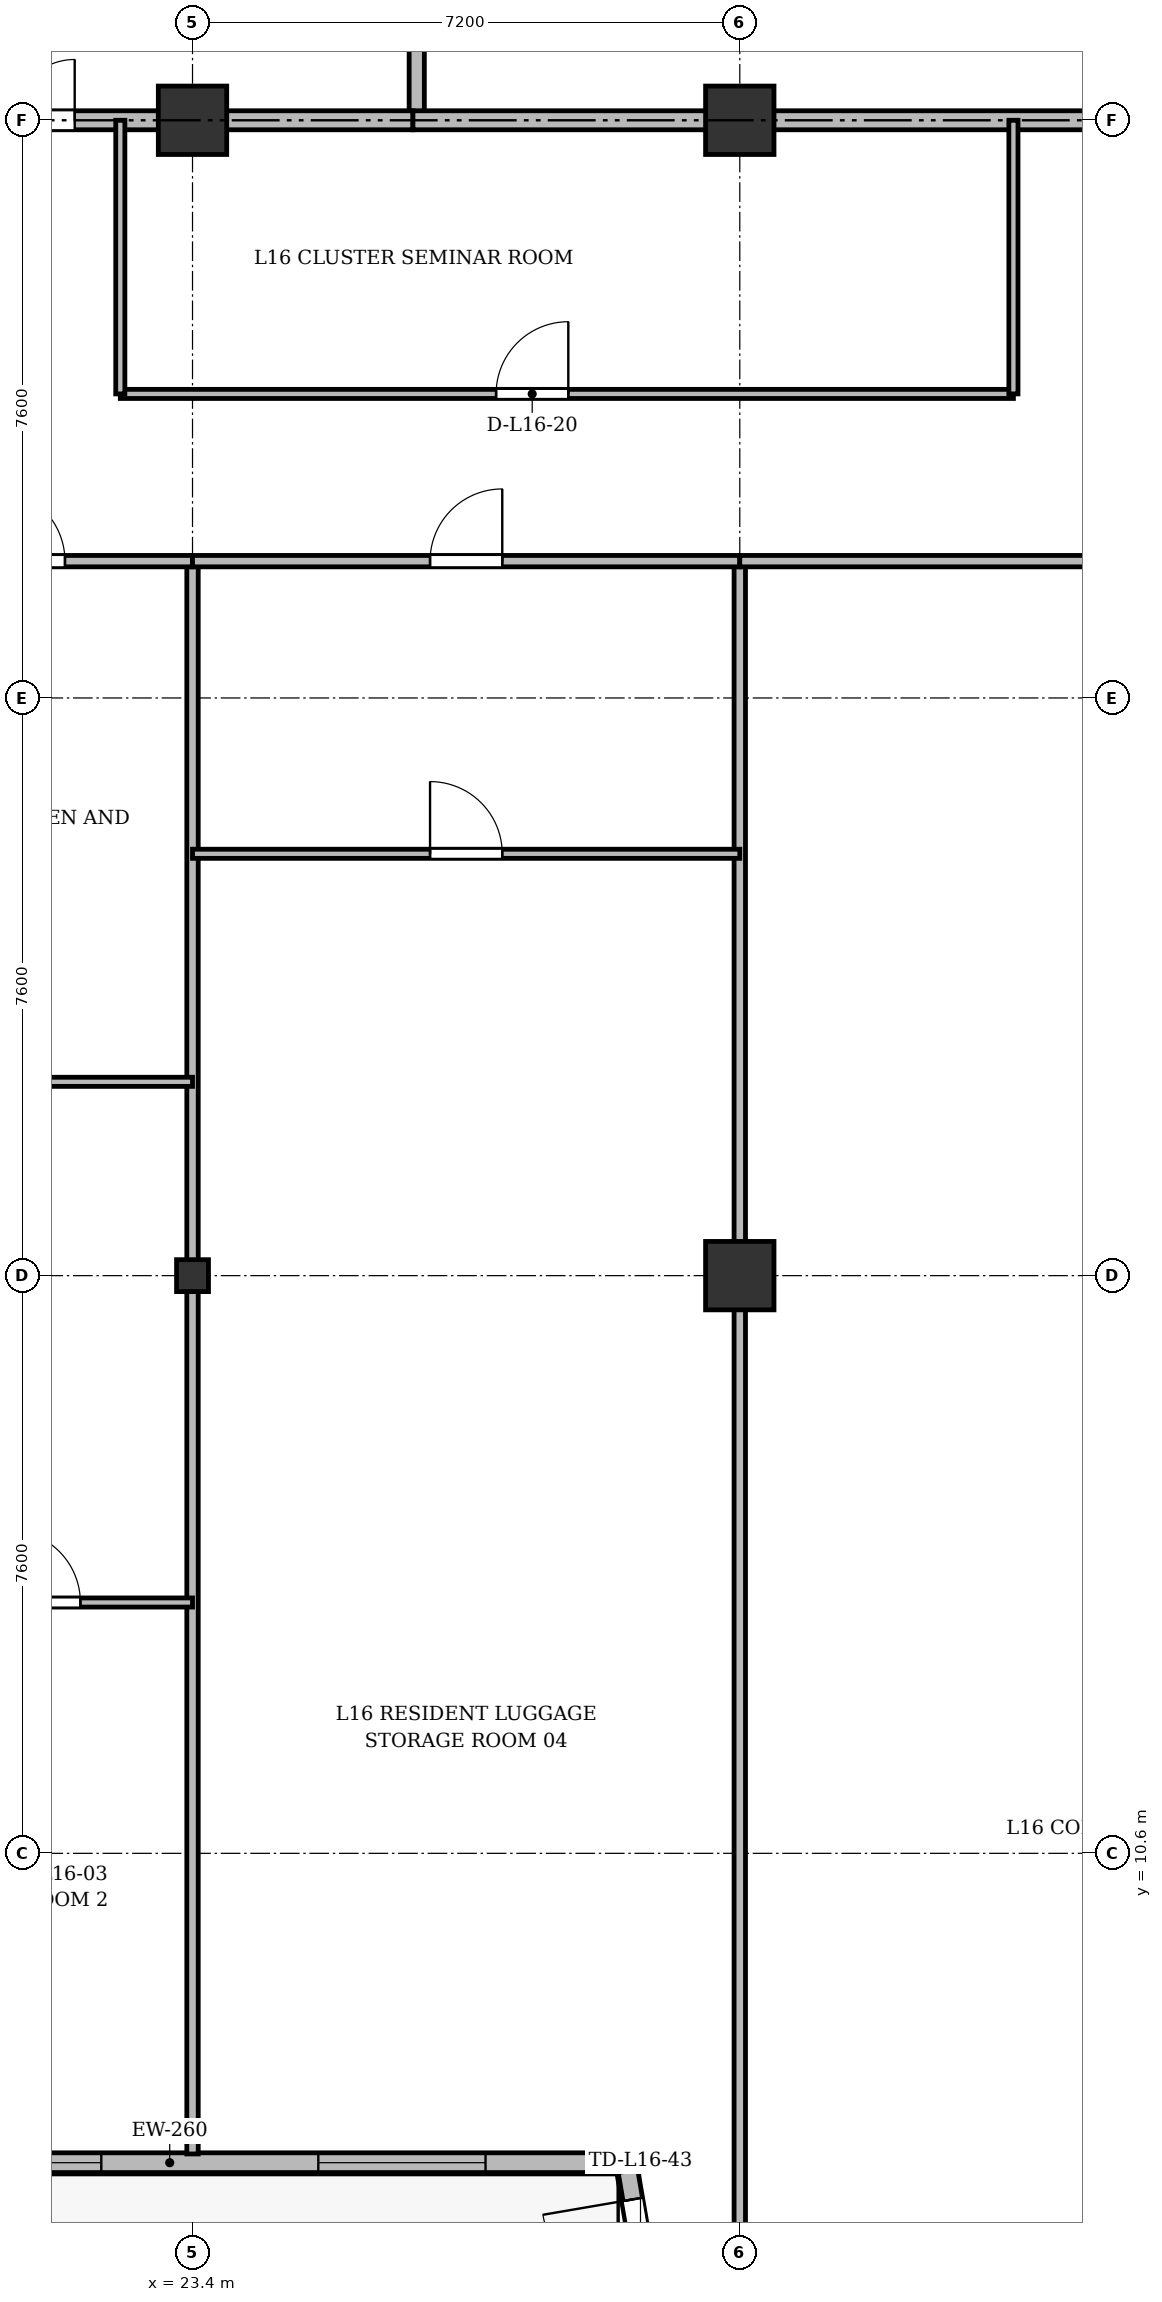
"""IFC4 building model, lengths in metres.
Left out: names, types, materials, properties, quantities, classifications, styles, units other than length and angle.
Written with IfcOpenShell. Run it as: python <this file> out.ifc"""

import sys

from ifc_helpers import new_model, si_unit, direction, frame, frame_2d, origin, origin_2d, place, context, subcontext, project, spatial, rectangle, i_section, extrude, source, transform, mapped, element, fill, save


model = new_model("IFC4")
c1 = context("Model", 3, precision=1e-05, world=origin(), true_north=direction((0.0, 1.0)))
c2 = subcontext(c1, "Body", "Model", "MODEL_VIEW")
j1 = project(units=[si_unit("LENGTHUNIT", "METRE"), si_unit("PLANEANGLEUNIT", "RADIAN")], contexts=[c1])
p1 = place(None, origin())
s1 = spatial("IfcSite", under=j1, at=p1, CompositionType="ELEMENT")
p2 = place(p1, origin())
s2 = spatial("IfcBuilding", under=s1, at=p2, CompositionType="ELEMENT")
p3 = place(p2, frame((0.0, 0.0, 63.1)))
s3 = spatial("IfcBuildingStorey", under=s2, at=p3, CompositionType="ELEMENT", Elevation=63.1)
m1 = source(origin(), c2, "Body", "SweptSolid", [
    extrude(i_section(OverallWidth=0.42, OverallDepth=0.42, WebThickness=0.026, FlangeThickness=0.04, at=origin_2d()), origin(), (0.0, 0.0, 1.0), 3.6),
])
p4 = place(p3, frame((23.4, 18.2, 0.0), z_axis=(0.0, 0.0, 1.0), x_axis=(1.0, 0.0, 0.0)))
e1 = element("IfcColumn", 1, at=p4, inside=s3, PredefinedType="COLUMN", context=c2, shape_type="MappedRepresentation", body=[
    mapped(m1, transform((0.0, 0.0, 0.0), x_axis=(1.0, 0.0, 0.0), y_axis=(0.0, 1.0, 0.0), z_axis=(0.0, 0.0, 1.0), scale=1.0)),
])
m2 = source(origin(), c2, "Body", "SweptSolid", [
    extrude(rectangle(XDim=0.9, YDim=0.9, at=origin_2d()), origin(), (0.0, 0.0, 1.0), 3.6),
])
for number, where, z_axis, x_axis in (
    (2, (23.4, 33.4, 0.0), (0.0, 0.0, 1.0), (1.0, 0.0, 0.0)),
    (3, (30.6, 18.2, 0.0), (0.0, 0.0, 1.0), (1.0, 0.0, 0.0)),
    (4, (30.6, 33.4, 0.0), (0.0, 0.0, 1.0), (1.0, 0.0, 0.0)),
):
    element("IfcColumn", number, at=place(p3, frame(where, z_axis=z_axis, x_axis=x_axis)), inside=s3, PredefinedType="COLUMN", context=c2, shape_type="MappedRepresentation", body=[
        mapped(m2, transform((0.0, 0.0, 0.0), x_axis=(1.0, 0.0, 0.0), y_axis=(0.0, 1.0, 0.0), z_axis=(0.0, 0.0, 1.0), scale=1.0)),
    ])
p5 = place(p3, frame((29.728, 2.922, 0.0), z_axis=(0.0, 0.0, 1.0), x_axis=(-0.168923741424, 0.98562912375, 0.0)))
e5 = element("IfcWall", 5, at=p5, inside=s3, PredefinedType="SOLIDWALL", context=c2, shape_type="SweptSolid", body=[
    extrude(rectangle(XDim=3.551, YDim=0.26, at=frame_2d((1.775, 0.0))), origin(), (0.0, 0.0, 1.0), 2.69),
])
p6 = place(p5, frame((1.971, 0.0, 0.0)))
e6 = element("IfcOpeningElement", 6, at=p6, cuts=e5, PredefinedType="OPENING", context=c2, shape_type="SweptSolid", body=[
    extrude(rectangle(XDim=1.2, YDim=2.2, at=frame_2d((0.6, 1.1))), frame((0.0, 0.14, 0.0), z_axis=(0.0, -1.0, 0.0), x_axis=(1.0, 0.0, 0.0)), (0.0, 0.0, 1.0), 0.28),
])
p7 = place(p3, frame((29.0, 6.53, 0.0), z_axis=(0.0, 0.0, 1.0), x_axis=(-1.0, 0.0, 0.0)))
e7 = element("IfcWall", 7, at=p7, inside=s3, PredefinedType="SOLIDWALL", context=c2, shape_type="SweptSolid", body=[
    extrude(rectangle(XDim=11.8, YDim=0.26, at=frame_2d((5.9, 0.0))), origin(), (0.0, 0.0, 1.0), 2.752),
])
p8 = place(p7, frame((1.745, 0.0, 0.9)))
e8 = element("IfcOpeningElement", 8, at=p8, cuts=e7, PredefinedType="OPENING", context=c2, shape_type="SweptSolid", body=[
    extrude(rectangle(XDim=2.2, YDim=1.75, at=frame_2d((1.1, 0.875))), frame((0.0, 0.14, 0.0), z_axis=(0.0, -1.0, 0.0), x_axis=(1.0, 0.0, 0.0)), (0.0, 0.0, 1.0), 0.28),
])
p9 = place(p7, frame((6.8, 0.0, 0.9)))
e9 = element("IfcOpeningElement", 9, at=p9, cuts=e7, PredefinedType="OPENING", context=c2, shape_type="SweptSolid", body=[
    extrude(rectangle(XDim=1.5, YDim=1.75, at=frame_2d((0.75, 0.875))), frame((0.0, 0.14, 0.0), z_axis=(0.0, -1.0, 0.0), x_axis=(1.0, 0.0, 0.0)), (0.0, 0.0, 1.0), 0.28),
])
p10 = place(p7, frame((9.855, 0.0, 0.9)))
e10 = element("IfcOpeningElement", 10, at=p10, cuts=e7, PredefinedType="OPENING", context=c2, shape_type="SweptSolid", body=[
    extrude(rectangle(XDim=1.5, YDim=1.75, at=frame_2d((0.75, 0.875))), frame((0.0, 0.14, 0.0), z_axis=(0.0, -1.0, 0.0), x_axis=(1.0, 0.0, 0.0)), (0.0, 0.0, 1.0), 0.28),
])
p11 = place(p3, frame((26.35, 33.4, 0.0), z_axis=(0.0, 0.0, 1.0), x_axis=(0.0, 1.0, 0.0)))
e11 = element("IfcWall", 11, at=p11, inside=s3, PredefinedType="SOLIDWALL", context=c2, shape_type="SweptSolid", body=[
    extrude(rectangle(XDim=11.3, YDim=0.2, at=frame_2d((5.65, 0.0))), origin(), (0.0, 0.0, 1.0), 2.69),
])
p12 = place(p3, frame((19.5, 33.4, 0.0), z_axis=(0.0, 0.0, 1.0), x_axis=(1.0, 0.0, 0.0)))
e12 = element("IfcWall", 12, at=p12, inside=s3, PredefinedType="PARTITIONING", context=c2, shape_type="SweptSolid", body=[
    extrude(rectangle(XDim=6.8, YDim=0.25, at=frame_2d((3.4, 0.0))), origin(), (0.0, 0.0, 1.0), 2.69),
])
p13 = place(p12, frame((0.75, 0.0, 0.0)))
e13 = element("IfcOpeningElement", 13, at=p13, cuts=e12, PredefinedType="OPENING", context=c2, shape_type="SweptSolid", body=[
    extrude(rectangle(XDim=1.6, YDim=2.2, at=frame_2d((0.8, 1.1))), frame((0.0, 0.135, 0.0), z_axis=(0.0, -1.0, 0.0), x_axis=(1.0, 0.0, 0.0)), (0.0, 0.0, 1.0), 0.27),
])
p14 = place(p3, frame((26.3, 33.4, 0.0), z_axis=(0.0, 0.0, 1.0), x_axis=(1.0, 0.0, 0.0)))
e14 = element("IfcWall", 14, at=p14, inside=s3, PredefinedType="PARTITIONING", context=c2, shape_type="SweptSolid", body=[
    extrude(rectangle(XDim=20.85, YDim=0.25, at=frame_2d((10.425, 0.0))), origin(), (0.0, 0.0, 1.0), 2.69),
])
p15 = place(p14, frame((9.2, 0.0, 0.0)))
e15 = element("IfcOpeningElement", 15, at=p15, cuts=e14, PredefinedType="OPENING", context=c2, shape_type="SweptSolid", body=[
    extrude(rectangle(XDim=1.6, YDim=2.2, at=frame_2d((0.8, 1.1))), frame((0.0, 0.135, 0.0), z_axis=(0.0, -1.0, 0.0), x_axis=(1.0, 0.0, 0.0)), (0.0, 0.0, 1.0), 0.27),
])
p16 = place(p3, frame((22.45, 29.8, 0.0), z_axis=(0.0, 0.0, 1.0), x_axis=(1.0, 0.0, 0.0)))
e16 = element("IfcWall", 16, at=p16, inside=s3, PredefinedType="PARTITIONING", context=c2, shape_type="SweptSolid", body=[
    extrude(rectangle(XDim=11.75, YDim=0.12, at=frame_2d((5.875, 0.0))), origin(), (0.0, 0.0, 1.0), 2.752),
])
p17 = place(p16, frame((4.944, 0.0, 0.0)))
e17 = element("IfcOpeningElement", 17, at=p17, cuts=e16, PredefinedType="OPENING", context=c2, shape_type="SweptSolid", body=[
    extrude(rectangle(XDim=0.95, YDim=2.15, at=frame_2d((0.475, 1.075))), frame((0.0, 0.07, 0.0), z_axis=(0.0, -1.0, 0.0), x_axis=(1.0, 0.0, 0.0)), (0.0, 0.0, 1.0), 0.14),
])
for number, where, z_axis, x_axis in (
    (18, (22.45, 29.8, 0.0), (0.0, 0.0, 1.0), (0.0, 1.0, 0.0)),
    (19, (34.2, 29.8, 0.0), (0.0, 0.0, 1.0), (0.0, 1.0, 0.0)),
):
    element("IfcWall", number, at=place(p3, frame(where, z_axis=z_axis, x_axis=x_axis)), inside=s3, PredefinedType="PARTITIONING", context=c2, shape_type="SweptSolid", body=[
        extrude(rectangle(XDim=3.6, YDim=0.12, at=frame_2d((1.8, 0.0))), origin(), (0.0, 0.0, 1.0), 2.69),
    ])
p18 = place(p3, frame((23.4, 6.645, 0.0), z_axis=(0.0, 0.0, 1.0), x_axis=(0.0, 1.0, 0.0)))
e20 = element("IfcWall", 20, at=p18, inside=s3, PredefinedType="PARTITIONING", context=c2, shape_type="SweptSolid", body=[
    extrude(rectangle(XDim=20.955, YDim=0.15, at=frame_2d((10.478, 0.0))), origin(), (0.0, 0.0, 1.0), 2.752),
])
p19 = place(p3, frame((30.6, 3.145, 0.0), z_axis=(0.0, 0.0, 1.0), x_axis=(0.0, 1.0, 0.0)))
e21 = element("IfcWall", 21, at=p19, inside=s3, PredefinedType="PARTITIONING", context=c2, shape_type="SweptSolid", body=[
    extrude(rectangle(XDim=24.455, YDim=0.15, at=frame_2d((12.228, 0.0))), origin(), (0.0, 0.0, 1.0), 2.752),
])
p20 = place(p3, frame((15.6, 20.75, 0.0), z_axis=(0.0, 0.0, 1.0), x_axis=(1.0, 0.0, 0.0)))
e22 = element("IfcWall", 22, at=p20, inside=s3, PredefinedType="PARTITIONING", context=c2, shape_type="SweptSolid", body=[
    extrude(rectangle(XDim=7.8, YDim=0.12, at=frame_2d((3.9, 0.0))), origin(), (0.0, 0.0, 1.0), 2.752),
])
p21 = place(p20, frame((3.333, 0.0, 0.0)))
e23 = element("IfcOpeningElement", 23, at=p21, cuts=e22, PredefinedType="OPENING", context=c2, shape_type="SweptSolid", body=[
    extrude(rectangle(XDim=0.95, YDim=2.15, at=frame_2d((0.475, 1.075))), frame((0.0, 0.07, 0.0), z_axis=(0.0, -1.0, 0.0), x_axis=(1.0, 0.0, 0.0)), (0.0, 0.0, 1.0), 0.14),
])
p22 = place(p3, frame((15.6, 27.6, 0.0), z_axis=(0.0, 0.0, 1.0), x_axis=(1.0, 0.0, 0.0)))
e24 = element("IfcWall", 24, at=p22, inside=s3, PredefinedType="PARTITIONING", context=c2, shape_type="SweptSolid", body=[
    extrude(rectangle(XDim=7.8, YDim=0.15, at=frame_2d((3.9, 0.0))), origin(), (0.0, 0.0, 1.0), 2.752),
])
p23 = place(p22, frame((5.172, 0.0, 0.0)))
e25 = element("IfcOpeningElement", 25, at=p23, cuts=e24, PredefinedType="OPENING", context=c2, shape_type="SweptSolid", body=[
    extrude(rectangle(XDim=0.95, YDim=2.15, at=frame_2d((0.475, 1.075))), frame((0.0, 0.085, 0.0), z_axis=(0.0, -1.0, 0.0), x_axis=(1.0, 0.0, 0.0)), (0.0, 0.0, 1.0), 0.17),
])
p24 = place(p3, frame((19.5, 13.9, 0.0), z_axis=(0.0, 0.0, 1.0), x_axis=(1.0, 0.0, 0.0)))
e26 = element("IfcWall", 26, at=p24, inside=s3, PredefinedType="PARTITIONING", context=c2, shape_type="SweptSolid", body=[
    extrude(rectangle(XDim=3.9, YDim=0.12, at=frame_2d((1.95, 0.0))), origin(), (0.0, 0.0, 1.0), 2.752),
])
p25 = place(p24, frame((1.475, 0.0, 0.0)))
e27 = element("IfcOpeningElement", 27, at=p25, cuts=e26, PredefinedType="OPENING", context=c2, shape_type="SweptSolid", body=[
    extrude(rectangle(XDim=0.95, YDim=2.15, at=frame_2d((0.475, 1.075))), frame((0.0, 0.07, 0.0), z_axis=(0.0, -1.0, 0.0), x_axis=(1.0, 0.0, 0.0)), (0.0, 0.0, 1.0), 0.14),
])
p26 = place(p3, frame((23.4, 27.6, 0.0), z_axis=(0.0, 0.0, 1.0), x_axis=(1.0, 0.0, 0.0)))
e28 = element("IfcWall", 28, at=p26, inside=s3, PredefinedType="PARTITIONING", context=c2, shape_type="SweptSolid", body=[
    extrude(rectangle(XDim=7.2, YDim=0.15, at=frame_2d((3.6, 0.0))), origin(), (0.0, 0.0, 1.0), 2.752),
])
p27 = place(p26, frame((3.125, 0.0, 0.0)))
e29 = element("IfcOpeningElement", 29, at=p27, cuts=e28, PredefinedType="OPENING", context=c2, shape_type="SweptSolid", body=[
    extrude(rectangle(XDim=0.95, YDim=2.15, at=frame_2d((0.475, 1.075))), frame((0.0, 0.085, 0.0), z_axis=(0.0, -1.0, 0.0), x_axis=(1.0, 0.0, 0.0)), (0.0, 0.0, 1.0), 0.17),
])
p28 = place(p3, frame((23.4, 23.75, 0.0), z_axis=(0.0, 0.0, 1.0), x_axis=(1.0, 0.0, 0.0)))
e30 = element("IfcWall", 30, at=p28, inside=s3, PredefinedType="PARTITIONING", context=c2, shape_type="SweptSolid", body=[
    extrude(rectangle(XDim=7.2, YDim=0.12, at=frame_2d((3.6, 0.0))), origin(), (0.0, 0.0, 1.0), 2.752),
])
p29 = place(p28, frame((3.125, 0.0, 0.0)))
e31 = element("IfcOpeningElement", 31, at=p29, cuts=e30, PredefinedType="OPENING", context=c2, shape_type="SweptSolid", body=[
    extrude(rectangle(XDim=0.95, YDim=2.15, at=frame_2d((0.475, 1.075))), frame((0.0, 0.07, 0.0), z_axis=(0.0, -1.0, 0.0), x_axis=(1.0, 0.0, 0.0)), (0.0, 0.0, 1.0), 0.14),
])
p30 = place(p3, frame((30.6, 27.6, 0.0), z_axis=(0.0, 0.0, 1.0), x_axis=(1.0, 0.0, 0.0)))
e32 = element("IfcWall", 32, at=p30, inside=s3, PredefinedType="PARTITIONING", context=c2, shape_type="SweptSolid", body=[
    extrude(rectangle(XDim=13.2, YDim=0.15, at=frame_2d((6.6, 0.0))), origin(), (0.0, 0.0, 1.0), 2.752),
])
p31 = place(p30, frame((5.8, 0.0, 0.0)))
e33 = element("IfcOpeningElement", 33, at=p31, cuts=e32, PredefinedType="OPENING", context=c2, shape_type="SweptSolid", body=[
    extrude(rectangle(XDim=1.6, YDim=2.2, at=frame_2d((0.8, 1.1))), frame((0.0, 0.085, 0.0), z_axis=(0.0, -1.0, 0.0), x_axis=(1.0, 0.0, 0.0)), (0.0, 0.0, 1.0), 0.17),
])
m3 = source(origin(), c2, "Body", "SweptSolid", [
    extrude(rectangle(XDim=1.2, YDim=2.2, at=frame_2d((0.6, 1.1))), frame((0.0, 0.025, 0.0), z_axis=(0.0, -1.0, 0.0), x_axis=(1.0, 0.0, 0.0)), (0.0, 0.0, 1.0), 0.05),
])
p32 = place(p6, origin())
e34 = element("IfcDoor", 34, at=p32, inside=s3, OperationType="SINGLE_SWING_RIGHT", PredefinedType="DOOR", context=c2, shape_type="MappedRepresentation", body=[
    mapped(m3, transform((0.0, 0.0, 0.0), x_axis=(1.0, 0.0, 0.0), y_axis=(0.0, 1.0, 0.0), z_axis=(0.0, 0.0, 1.0), scale=1.0)),
])
fill(e6, e34)
m4 = source(origin(), c2, "Body", "SweptSolid", [
    extrude(rectangle(XDim=2.2, YDim=1.75, at=frame_2d((1.1, 0.875))), frame((0.0, 0.03, 0.0), z_axis=(0.0, -1.0, 0.0), x_axis=(1.0, 0.0, 0.0)), (0.0, 0.0, 1.0), 0.06),
])
p33 = place(p8, origin())
e35 = element("IfcWindow", 35, at=p33, inside=s3, PartitioningType="SINGLE_PANEL", PredefinedType="WINDOW", context=c2, shape_type="MappedRepresentation", body=[
    mapped(m4, transform((0.0, 0.0, 0.0), x_axis=(1.0, 0.0, 0.0), y_axis=(0.0, 1.0, 0.0), z_axis=(0.0, 0.0, 1.0), scale=1.0)),
])
fill(e8, e35)
m5 = source(origin(), c2, "Body", "SweptSolid", [
    extrude(rectangle(XDim=1.5, YDim=1.75, at=frame_2d((0.75, 0.875))), frame((0.0, 0.03, 0.0), z_axis=(0.0, -1.0, 0.0), x_axis=(1.0, 0.0, 0.0)), (0.0, 0.0, 1.0), 0.06),
])
p34 = place(p9, origin())
e36 = element("IfcWindow", 36, at=p34, inside=s3, PartitioningType="SINGLE_PANEL", PredefinedType="WINDOW", context=c2, shape_type="MappedRepresentation", body=[
    mapped(m5, transform((0.0, 0.0, 0.0), x_axis=(1.0, 0.0, 0.0), y_axis=(0.0, 1.0, 0.0), z_axis=(0.0, 0.0, 1.0), scale=1.0)),
])
fill(e9, e36)
m6 = source(origin(), c2, "Body", "SweptSolid", [
    extrude(rectangle(XDim=1.6, YDim=2.2, at=frame_2d((0.8, 1.1))), frame((0.0, 0.025, 0.0), z_axis=(0.0, -1.0, 0.0), x_axis=(1.0, 0.0, 0.0)), (0.0, 0.0, 1.0), 0.05),
])
p35 = place(p13, origin())
e37 = element("IfcDoor", 37, at=p35, inside=s3, OperationType="DOUBLE_DOOR_SINGLE_SWING", PredefinedType="DOOR", context=c2, shape_type="MappedRepresentation", body=[
    mapped(m6, transform((0.0, 0.0, 0.0), x_axis=(1.0, 0.0, 0.0), y_axis=(0.0, 1.0, 0.0), z_axis=(0.0, 0.0, 1.0), scale=1.0)),
])
fill(e13, e37)
m7 = source(origin(), c2, "Body", "SweptSolid", [
    extrude(rectangle(XDim=0.95, YDim=2.15, at=frame_2d((0.475, 1.075))), frame((0.0, 0.025, 0.0), z_axis=(0.0, -1.0, 0.0), x_axis=(1.0, 0.0, 0.0)), (0.0, 0.0, 1.0), 0.05),
])
p36 = place(p17, origin())
e38 = element("IfcDoor", 38, at=p36, inside=s3, OperationType="SINGLE_SWING_RIGHT", PredefinedType="DOOR", context=c2, shape_type="MappedRepresentation", body=[
    mapped(m7, transform((0.0, 0.0, 0.0), x_axis=(1.0, 0.0, 0.0), y_axis=(0.0, 1.0, 0.0), z_axis=(0.0, 0.0, 1.0), scale=1.0)),
])
fill(e17, e38)
p37 = place(p23, origin())
e39 = element("IfcDoor", 39, at=p37, inside=s3, OperationType="SINGLE_SWING_LEFT", PredefinedType="DOOR", context=c2, shape_type="MappedRepresentation", body=[
    mapped(m7, transform((0.0, 0.0, 0.0), x_axis=(1.0, 0.0, 0.0), y_axis=(0.0, 1.0, 0.0), z_axis=(0.0, 0.0, 1.0), scale=1.0)),
])
fill(e25, e39)
p38 = place(p25, origin())
e40 = element("IfcDoor", 40, at=p38, inside=s3, OperationType="SINGLE_SWING_LEFT", PredefinedType="DOOR", context=c2, shape_type="MappedRepresentation", body=[
    mapped(m7, transform((0.0, 0.0, 0.0), x_axis=(1.0, 0.0, 0.0), y_axis=(0.0, 1.0, 0.0), z_axis=(0.0, 0.0, 1.0), scale=1.0)),
])
fill(e27, e40)
p39 = place(p27, origin())
e41 = element("IfcDoor", 41, at=p39, inside=s3, OperationType="SINGLE_SWING_RIGHT", PredefinedType="DOOR", context=c2, shape_type="MappedRepresentation", body=[
    mapped(m7, transform((0.0, 0.0, 0.0), x_axis=(1.0, 0.0, 0.0), y_axis=(0.0, 1.0, 0.0), z_axis=(0.0, 0.0, 1.0), scale=1.0)),
])
fill(e29, e41)
p40 = place(p29, origin())
e42 = element("IfcDoor", 42, at=p40, inside=s3, OperationType="SINGLE_SWING_LEFT", PredefinedType="DOOR", context=c2, shape_type="MappedRepresentation", body=[
    mapped(m7, transform((0.0, 0.0, 0.0), x_axis=(1.0, 0.0, 0.0), y_axis=(0.0, 1.0, 0.0), z_axis=(0.0, 0.0, 1.0), scale=1.0)),
])
fill(e31, e42)
save(model, sys.argv[1])
